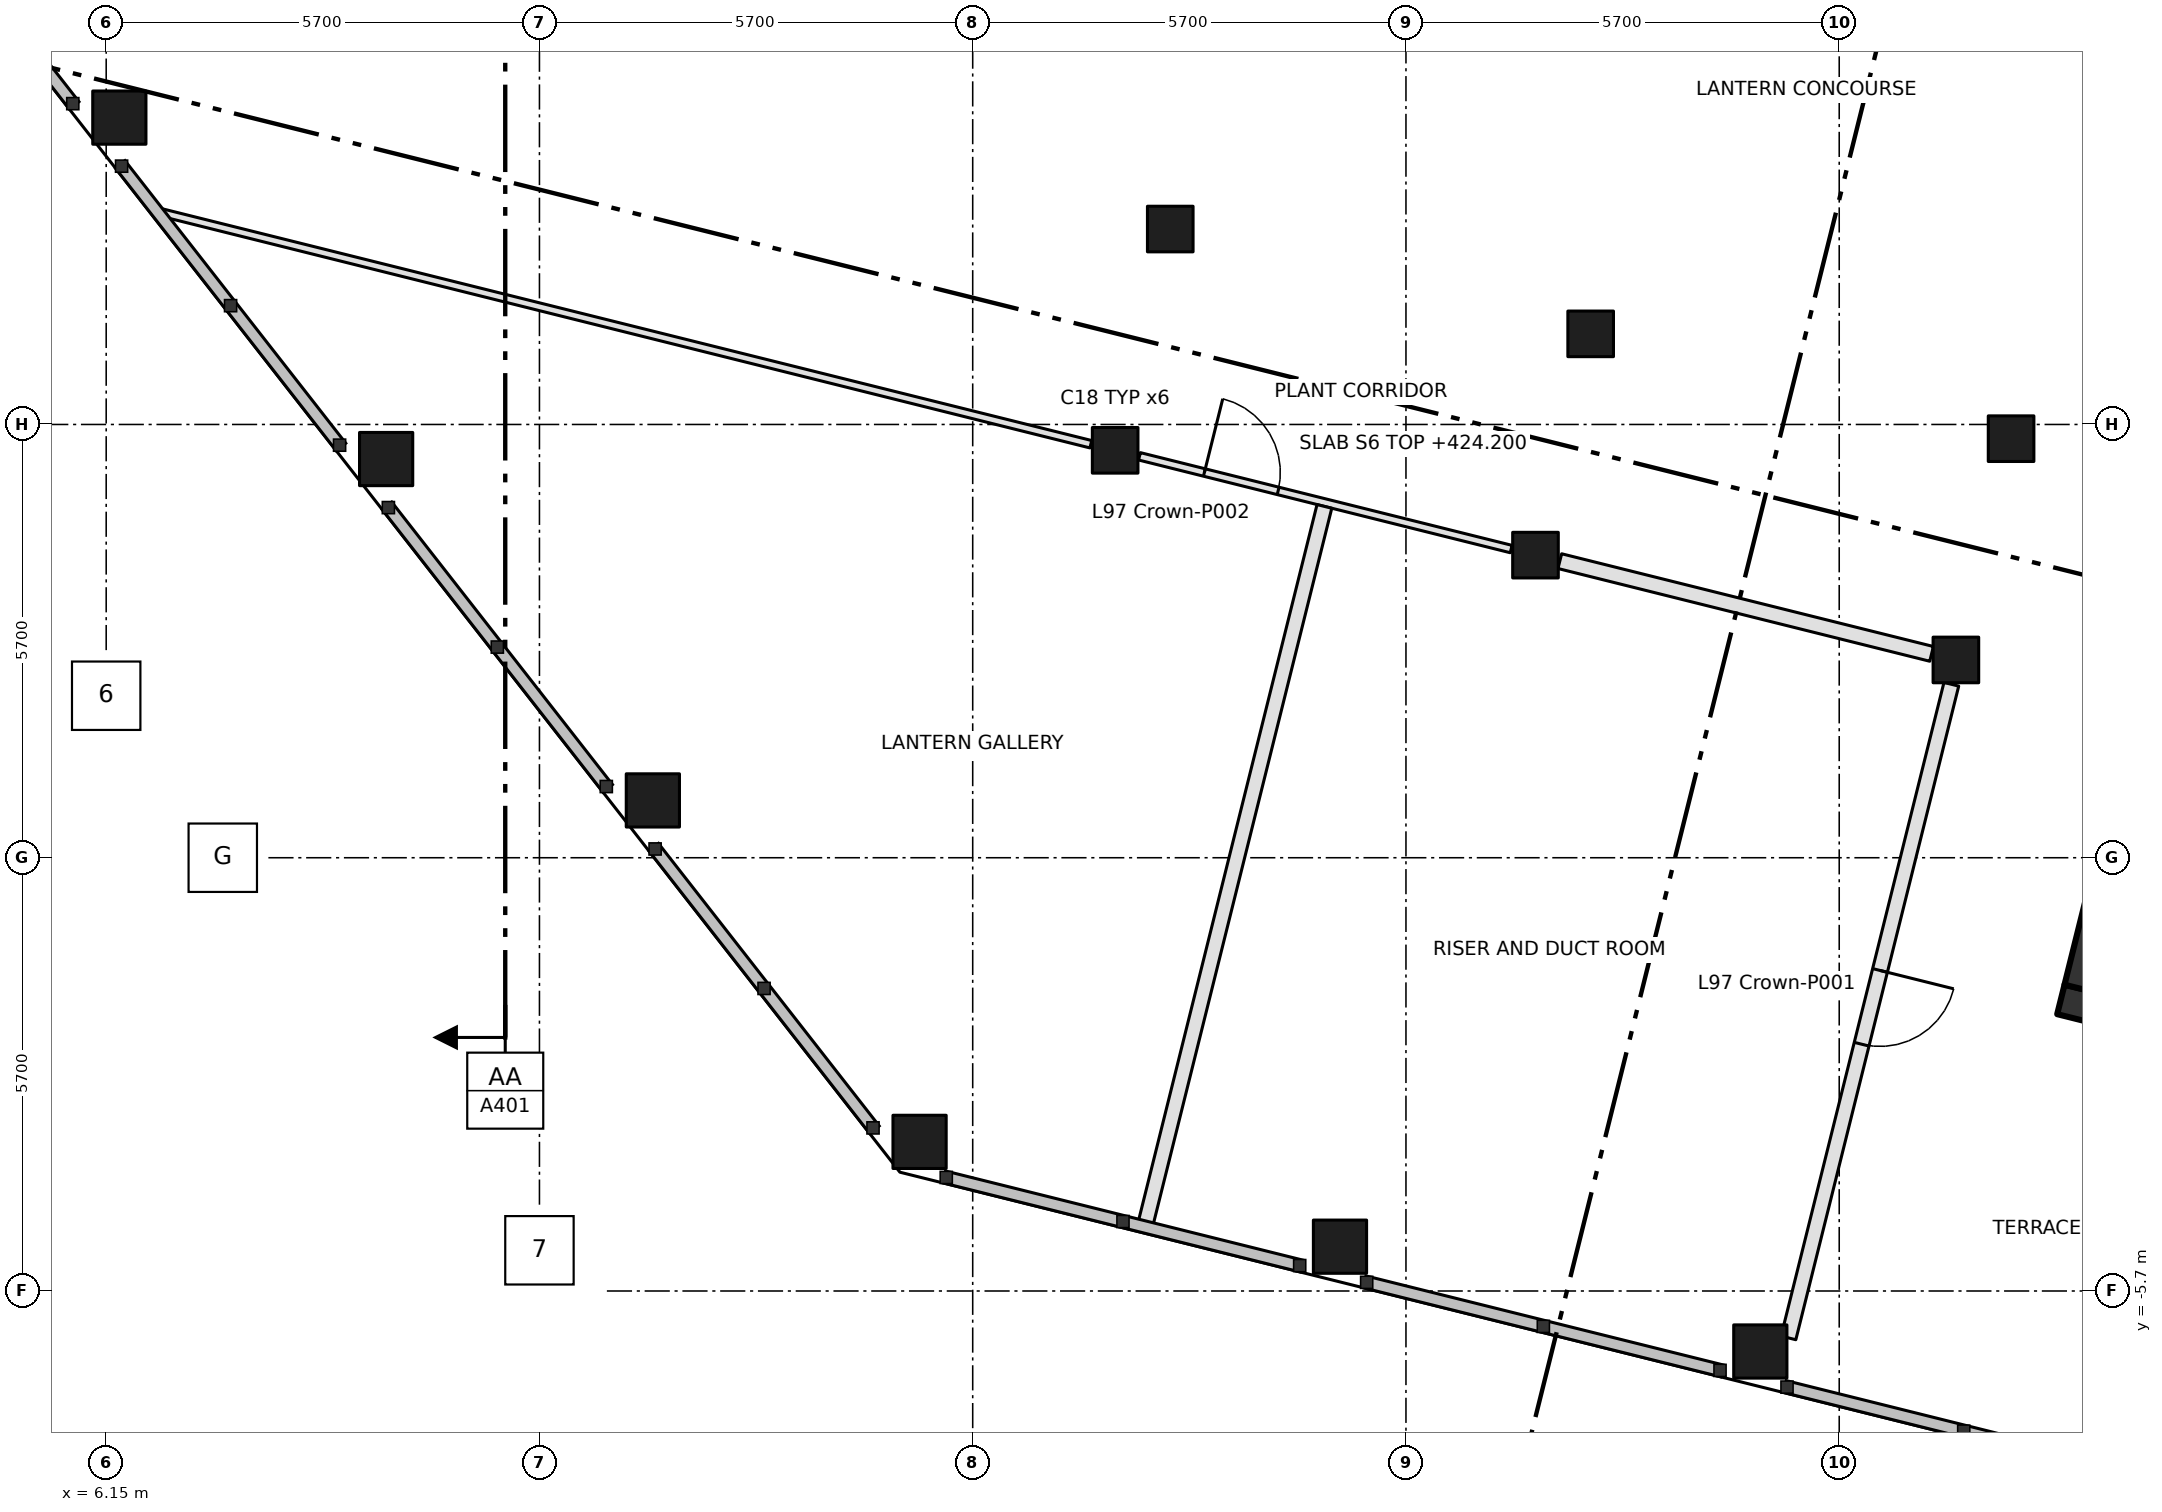
"""IFC4 building model, lengths in metres.
Left out: names, types, materials, properties, quantities, classifications, styles, units other than length and angle.
Written with IfcOpenShell. Run it as: python <this file> out.ifc"""

import sys

from ifc_helpers import new_model, si_unit, direction, frame, frame_2d, origin, origin_2d, place, context, subcontext, project, spatial, rectangle, extrude, element, fill, save


model = new_model("IFC4")
c1 = context("Model", 3, precision=1e-05, world=origin(), true_north=direction((0.0, 1.0)))
c2 = subcontext(c1, "Body", "Model", "MODEL_VIEW")
j1 = project(units=[si_unit("LENGTHUNIT", "METRE"), si_unit("PLANEANGLEUNIT", "RADIAN")], contexts=[c1])
p1 = place(None, origin())
s1 = spatial("IfcSite", under=j1, at=p1, CompositionType="ELEMENT")
p2 = place(p1, origin())
s2 = spatial("IfcBuilding", under=s1, at=p2, CompositionType="ELEMENT")
p3 = place(p2, frame((0.0, 0.0, 424.2)))
s3 = spatial("IfcBuildingStorey", under=s2, at=p3, CompositionType="ELEMENT", Elevation=424.2)
for number, where, z_axis, x_axis in (
    (1, (16.851, -3.738, 0.0), (0.0, 0.0, 1.0), (1.0, 0.0, 0.0)),
    (2, (13.342, 0.754, 0.0), (0.0, 0.0, 1.0), (1.0, 0.0, 0.0)),
    (3, (9.833, 5.245, 0.0), (0.0, 0.0, 1.0), (1.0, 0.0, 0.0)),
    (4, (6.323, 9.737, 0.0), (0.0, 0.0, 1.0), (1.0, 0.0, 0.0)),
    (5, (22.382, -5.117, 0.0), (0.0, 0.0, 1.0), (1.0, 0.0, 0.0)),
    (6, (27.912, -6.496, 0.0), (0.0, 0.0, 1.0), (1.0, 0.0, 0.0)),
):
    element("IfcColumn", number, at=place(p3, frame(where, z_axis=z_axis, x_axis=x_axis)), inside=s3, PredefinedType="COLUMN", context=c2, shape_type="SweptSolid", body=[
        extrude(rectangle(XDim=0.7, YDim=0.7, at=origin_2d()), origin(), (0.0, 0.0, 1.0), 4.8),
    ])
for number, where, z_axis, x_axis in (
    (7, (19.424, 5.36, 0.0), (0.0, 0.0, 1.0), (1.0, 0.0, 0.0)),
    (8, (24.954, 3.981, 0.0), (0.0, 0.0, 1.0), (1.0, 0.0, 0.0)),
    (9, (30.485, 2.602, 0.0), (0.0, 0.0, 1.0), (1.0, 0.0, 0.0)),
    (10, (20.149, 8.271, 0.0), (0.0, 0.0, 1.0), (1.0, 0.0, 0.0)),
    (11, (25.68, 6.892, 0.0), (0.0, 0.0, 1.0), (1.0, 0.0, 0.0)),
    (12, (31.211, 5.513, 0.0), (0.0, 0.0, 1.0), (1.0, 0.0, 0.0)),
):
    element("IfcColumn", number, at=place(p3, frame(where, z_axis=z_axis, x_axis=x_axis)), inside=s3, PredefinedType="COLUMN", context=c2, shape_type="SweptSolid", body=[
        extrude(rectangle(XDim=0.6, YDim=0.6, at=origin_2d()), origin(), (0.0, 0.0, 1.0), 4.8),
    ])
p4 = place(p3, frame((31.866, -1.864, -0.3), z_axis=(0.0, 0.0, 1.0), x_axis=(0.970281225948, -0.241980045814, 0.0)))
e13 = element("IfcWall", 13, at=p4, inside=s3, PredefinedType="SHEAR", context=c2, shape_type="SweptSolid", body=[
    extrude(rectangle(XDim=9.1, YDim=0.4, at=frame_2d((4.55, 0.0))), origin(), (0.0, 0.0, 1.0), 4.75),
])
p5 = place(p3, frame((32.108, -1.719, -0.3), z_axis=(0.0, 0.0, 1.0), x_axis=(0.241912337509, 0.970298109326, 0.0)))
e14 = element("IfcWall", 14, at=p5, inside=s3, PredefinedType="SHEAR", context=c2, shape_type="SweptSolid", body=[
    extrude(rectangle(XDim=10.6, YDim=0.4, at=frame_2d((5.3, 0.0))), origin(), (0.0, 0.0, 1.0), 4.75),
])
p6 = place(p5, frame((4.4, 0.0, 0.3)))
e15 = element("IfcOpeningElement", 15, at=p6, cuts=e14, PredefinedType="OPENING", context=c2, shape_type="SweptSolid", body=[
    extrude(rectangle(XDim=1.8, YDim=2.1, at=frame_2d((0.9, 1.05))), frame((0.0, 0.21, 0.0), z_axis=(0.0, -1.0, 0.0), x_axis=(1.0, 0.0, 0.0)), (0.0, 0.0, 1.0), 0.42),
])
p7 = place(p3, frame((6.82, 8.503, 0.0), z_axis=(0.0, 0.0, 1.0), x_axis=(0.970288651432, -0.241950269482, 0.0)))
e16 = element("IfcWall", 16, at=p7, inside=s3, PredefinedType="PARTITIONING", context=c2, shape_type="SweptSolid", body=[
    extrude(rectangle(XDim=12.661, YDim=0.1, at=frame_2d((6.33, 0.0))), origin(), (0.0, 0.0, 1.0), 4.45),
])
p8 = place(p3, frame((19.744, 5.281, 0.0), z_axis=(0.0, 0.0, 1.0), x_axis=(0.970262058426, -0.242056889963, 0.0)))
e17 = element("IfcWall", 17, at=p8, inside=s3, PredefinedType="PARTITIONING", context=c2, shape_type="SweptSolid", body=[
    extrude(rectangle(XDim=5.04, YDim=0.1, at=frame_2d((2.52, 0.0))), origin(), (0.0, 0.0, 1.0), 4.45),
])
p9 = place(p8, frame((0.88, 0.0, 0.0)))
e18 = element("IfcOpeningElement", 18, at=p9, cuts=e17, PredefinedType="OPENING", context=c2, shape_type="SweptSolid", body=[
    extrude(rectangle(XDim=1.0, YDim=2.1, at=frame_2d((0.5, 1.05))), frame((0.0, 0.06, 0.0), z_axis=(0.0, -1.0, 0.0), x_axis=(1.0, 0.0, 0.0)), (0.0, 0.0, 1.0), 0.12),
])
p10 = place(p3, frame((25.274, 3.902, 0.0), z_axis=(0.0, 0.0, 1.0), x_axis=(0.970262034576, -0.242056985565, 0.0)))
e19 = element("IfcWall", 19, at=p10, inside=s3, PredefinedType="PARTITIONING", context=c2, shape_type="SweptSolid", body=[
    extrude(rectangle(XDim=5.041, YDim=0.2, at=frame_2d((2.521, 0.0))), origin(), (0.0, 0.0, 1.0), 4.45),
])
p11 = place(p3, frame((30.425, 2.282, 0.0), z_axis=(0.0, 0.0, 1.0), x_axis=(-0.241828998562, -0.970318883385, 0.0)))
e20 = element("IfcWall", 20, at=p11, inside=s3, PredefinedType="PARTITIONING", context=c2, shape_type="SweptSolid", body=[
    extrude(rectangle(XDim=8.862, YDim=0.2, at=frame_2d((4.431, 0.0))), origin(), (0.0, 0.0, 1.0), 4.45),
])
p12 = place(p11, frame((3.88, 0.0, 0.0)))
e21 = element("IfcOpeningElement", 21, at=p12, cuts=e20, PredefinedType="OPENING", context=c2, shape_type="SweptSolid", body=[
    extrude(rectangle(XDim=1.0, YDim=2.1, at=frame_2d((0.5, 1.05))), frame((0.0, 0.11, 0.0), z_axis=(0.0, -1.0, 0.0), x_axis=(1.0, 0.0, 0.0)), (0.0, 0.0, 1.0), 0.22),
])
p13 = place(p3, frame((19.812, -4.863, 0.0), z_axis=(0.0, 0.0, 1.0), x_axis=(0.241900932466, 0.970300952732, 0.0)))
e22 = element("IfcWall", 22, at=p13, inside=s3, PredefinedType="PARTITIONING", context=c2, shape_type="SweptSolid", body=[
    extrude(rectangle(XDim=9.776, YDim=0.2, at=frame_2d((4.888, 0.0))), origin(), (0.0, 0.0, 1.0), 4.45),
])
p14 = place(p12, origin())
e23 = element("IfcDoor", 23, at=p14, inside=s3, OperationType="SINGLE_SWING_LEFT", PredefinedType="DOOR", context=c2, shape_type="SweptSolid", body=[
    extrude(rectangle(XDim=1.0, YDim=2.1, at=frame_2d((0.5, 1.05))), frame((0.0, 0.025, 0.0), z_axis=(0.0, -1.0, 0.0), x_axis=(1.0, 0.0, 0.0)), (0.0, 0.0, 1.0), 0.05),
])
fill(e21, e23)
p15 = place(p9, origin())
e24 = element("IfcDoor", 24, at=p15, inside=s3, OperationType="SINGLE_SWING_LEFT", PredefinedType="DOOR", context=c2, shape_type="SweptSolid", body=[
    extrude(rectangle(XDim=1.0, YDim=2.1, at=frame_2d((0.5, 1.05))), frame((0.0, 0.025, 0.0), z_axis=(0.0, -1.0, 0.0), x_axis=(1.0, 0.0, 0.0)), (0.0, 0.0, 1.0), 0.05),
])
fill(e18, e24)
save(model, sys.argv[1])
